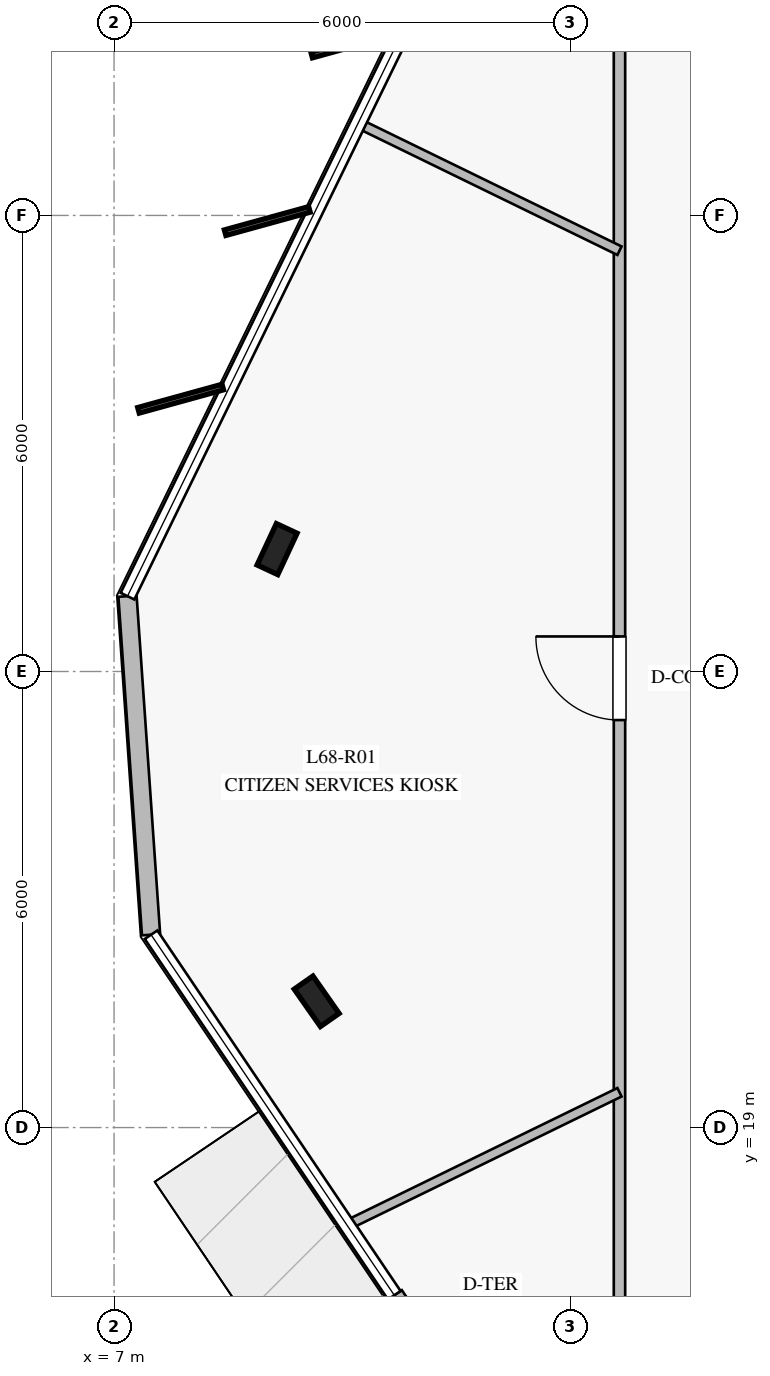
"""IFC4 building model, lengths in metres.
Left out: names, types, materials, properties, quantities, classifications, styles, units other than length and angle.
Written with IfcOpenShell. Run it as: python <this file> out.ifc"""

import sys

from ifc_helpers import new_model, si_unit, direction, frame, frame_2d, origin, origin_2d, place, context, subcontext, project, spatial, rectangle, i_section, extrude, element, fill, save


model = new_model("IFC4")
c1 = context("Model", 3, precision=1e-05, world=origin(), true_north=direction((0.0, 1.0)))
c2 = subcontext(c1, "Body", "Model", "MODEL_VIEW")
j1 = project(units=[si_unit("LENGTHUNIT", "METRE"), si_unit("PLANEANGLEUNIT", "RADIAN")], contexts=[c1])
p1 = place(None, origin())
s1 = spatial("IfcSite", under=j1, at=p1, CompositionType="ELEMENT")
p2 = place(p1, origin())
s2 = spatial("IfcBuilding", under=s1, at=p2, CompositionType="ELEMENT")
p3 = place(p2, frame((0.0, 0.0, 282.2)))
s3 = spatial("IfcBuildingStorey", under=s2, at=p3, CompositionType="ELEMENT", Elevation=282.2)
for number, where, z_axis, x_axis in (
    (1, (9.145, 26.61, 0.0), (0.0, 0.0, 1.0), (0.423, 0.906, 0.0)),
    (2, (9.666, 20.661, 0.0), (0.0, 0.0, 1.0), (-0.574, 0.819, 0.0)),
):
    element("IfcColumn", number, at=place(p3, frame(where, z_axis=z_axis, x_axis=x_axis)), inside=s3, PredefinedType="COLUMN", context=c2, shape_type="SweptSolid", body=[
        extrude(i_section(OverallWidth=0.3, OverallDepth=0.6, WebThickness=0.015, FlangeThickness=0.03, at=origin_2d()), origin(), (0.0, 0.0, 1.0), 4.0),
    ])
p4 = place(p3, frame((7.177, 25.991, 0.0), z_axis=(0.0, 0.0, 1.0), x_axis=(0.069447662525, -0.997585596413, 0.0)))
e3 = element("IfcWall", 3, at=p4, inside=s3, PredefinedType="STANDARD", context=c2, shape_type="SweptSolid", body=[
    extrude(rectangle(XDim=4.465, YDim=0.24, at=frame_2d((2.232, 0.0))), origin(), (0.0, 0.0, 1.0), 3.78),
])
p5 = place(p3, frame((10.687, 16.794, 0.0), z_axis=(0.0, 0.0, 1.0), x_axis=(0.559128660759, -0.82908090119, 0.0)))
e4 = element("IfcWall", 4, at=p5, inside=s3, PredefinedType="STANDARD", context=c2, shape_type="SweptSolid", body=[
    extrude(rectangle(XDim=2.4, YDim=0.24, at=frame_2d((1.2, 0.0))), origin(), (0.0, 0.0, 1.0), 3.78),
])
p6 = place(p5, frame((0.4, 0.0, 0.0)))
e5 = element("IfcOpeningElement", 5, at=p6, cuts=e4, PredefinedType="OPENING", context=c2, shape_type="SweptSolid", body=[
    extrude(rectangle(XDim=1.6, YDim=2.25, at=frame_2d((0.8, 1.125))), frame((0.0, 0.13, 0.0), z_axis=(0.0, -1.0, 0.0), x_axis=(1.0, 0.0, 0.0)), (0.0, 0.0, 1.0), 0.26),
])
p7 = place(p3, frame((13.65, 14.25, 0.0), z_axis=(0.0, 0.0, 1.0), x_axis=(0.0, 1.0, 0.0)))
e6 = element("IfcWall", 6, at=p7, inside=s3, PredefinedType="PARTITIONING", context=c2, shape_type="SweptSolid", body=[
    extrude(rectangle(XDim=21.5, YDim=0.15, at=frame_2d((10.75, 0.0))), origin(), (0.0, 0.0, 1.0), 3.05),
])
p8 = place(p7, frame((10.111, 0.0, 0.0)))
e7 = element("IfcOpeningElement", 7, at=p8, cuts=e6, PredefinedType="OPENING", context=c2, shape_type="SweptSolid", body=[
    extrude(rectangle(XDim=1.1, YDim=2.2, at=frame_2d((0.55, 1.1))), frame((0.0, 0.085, 0.0), z_axis=(0.0, -1.0, 0.0), x_axis=(1.0, 0.0, 0.0)), (0.0, 0.0, 1.0), 0.17),
])
p9 = place(p3, frame((13.65, 30.536, 0.0), z_axis=(0.0, 0.0, 1.0), x_axis=(-0.898817087616, 0.438323901938, 0.0)))
e8 = element("IfcWall", 8, at=p9, inside=s3, PredefinedType="PARTITIONING", context=c2, shape_type="SweptSolid", body=[
    extrude(rectangle(XDim=3.81, YDim=0.125, at=frame_2d((1.905, 0.0))), origin(), (0.0, 0.0, 1.0), 3.05),
])
p10 = place(p3, frame((13.65, 19.464, 0.0), z_axis=(0.0, 0.0, 1.0), x_axis=(-0.898688096622, -0.438588309226, 0.0)))
e9 = element("IfcWall", 9, at=p10, inside=s3, PredefinedType="PARTITIONING", context=c2, shape_type="SweptSolid", body=[
    extrude(rectangle(XDim=3.972, YDim=0.125, at=frame_2d((1.986, 0.0))), origin(), (0.0, 0.0, 1.0), 3.28),
])
p11 = place(p8, origin())
e10 = element("IfcDoor", 10, at=p11, inside=s3, OperationType="SINGLE_SWING_RIGHT", PredefinedType="DOOR", context=c2, shape_type="SweptSolid", body=[
    extrude(rectangle(XDim=1.1, YDim=2.2, at=frame_2d((0.55, 1.1))), frame((0.0, 0.025, 0.0), z_axis=(0.0, -1.0, 0.0), x_axis=(1.0, 0.0, 0.0)), (0.0, 0.0, 1.0), 0.05),
])
fill(e7, e10)
save(model, sys.argv[1])
